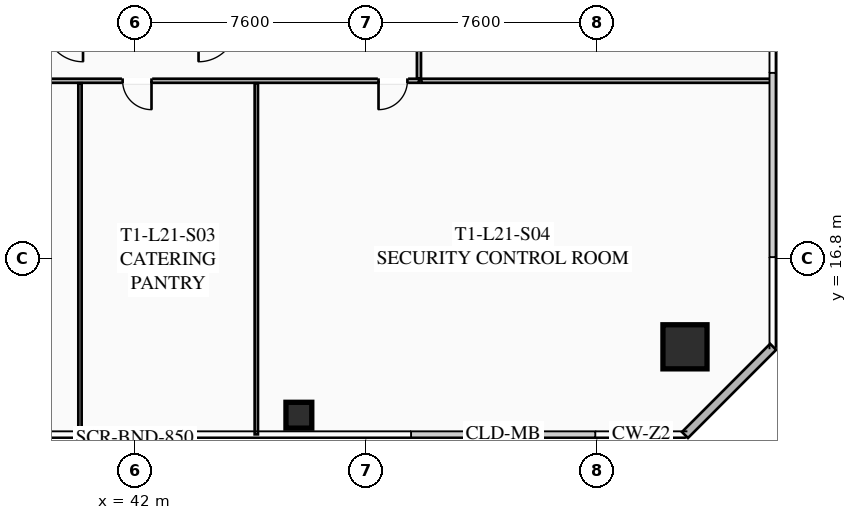
"""IFC4 building model, lengths in metres.
Left out: names, types, materials, properties, quantities, classifications, styles, units other than length and angle.
Written with IfcOpenShell. Run it as: python <this file> out.ifc"""

import sys

from ifc_helpers import new_model, si_unit, direction, frame, frame_2d, origin, origin_2d, place, context, subcontext, project, spatial, rectangle, hollow_rectangle, extrude, element, fill, save


model = new_model("IFC4")
c1 = context("Model", 3, precision=1e-05, world=origin(), true_north=direction((0.0, 1.0)))
c2 = subcontext(c1, "Body", "Model", "MODEL_VIEW")
j1 = project(units=[si_unit("LENGTHUNIT", "METRE"), si_unit("PLANEANGLEUNIT", "RADIAN")], contexts=[c1])
p1 = place(None, origin())
s1 = spatial("IfcSite", under=j1, at=p1, CompositionType="ELEMENT")
p2 = place(p1, origin())
s2 = spatial("IfcBuilding", under=s1, at=p2, CompositionType="ELEMENT")
p3 = place(p2, frame((0.0, 0.0, 81.4)))
s3 = spatial("IfcBuildingStorey", under=s2, at=p3, CompositionType="ELEMENT", Elevation=81.4)
p4 = place(p3, frame((60.1, 13.9, 0.0), z_axis=(0.0, 0.0, 1.0), x_axis=(1.0, 0.0, 0.0)))
e1 = element("IfcColumn", 1, at=p4, inside=s3, PredefinedType="COLUMN", context=c2, shape_type="SweptSolid", body=[
    extrude(hollow_rectangle(XDim=1.45, YDim=1.45, WallThickness=0.055, at=origin_2d()), origin(), (0.0, 0.0, 1.0), 3.35),
])
p5 = place(p3, frame((47.4, 11.65, 0.0), z_axis=(0.0, 0.0, 1.0), x_axis=(1.0, 0.0, 0.0)))
e2 = element("IfcColumn", 2, at=p5, inside=s3, PredefinedType="COLUMN", context=c2, shape_type="SweptSolid", body=[
    extrude(hollow_rectangle(XDim=0.85, YDim=0.85, WallThickness=0.035, at=origin_2d()), origin(), (0.0, 0.0, 1.0), 3.35),
])
p6 = place(p3, frame((63.0, 13.9, 0.0), z_axis=(0.0, 0.0, 1.0), x_axis=(-0.707106781187, -0.707106781187, 0.0)))
e3 = element("IfcWall", 3, at=p6, inside=s3, PredefinedType="SOLIDWALL", context=c2, shape_type="SweptSolid", body=[
    extrude(rectangle(XDim=4.101, YDim=0.28, at=frame_2d((2.051, 0.0))), origin(), (0.0, 0.0, 1.0), 3.35),
])
p7 = place(p3, frame((51.35, 22.65, 0.0), z_axis=(0.0, 0.0, 1.0), x_axis=(-1.0, 0.0, 0.0)))
e4 = element("IfcWall", 4, at=p7, inside=s3, PredefinedType="PARTITIONING", context=c2, shape_type="SweptSolid", body=[
    extrude(rectangle(XDim=27.3, YDim=0.135, at=frame_2d((13.65, 0.0))), origin(), (0.0, 0.0, 1.0), 2.703),
])
p8 = place(p7, frame((25.97, 0.0, 0.0)))
e5 = element("IfcOpeningElement", 5, at=p8, cuts=e4, PredefinedType="OPENING", context=c2, shape_type="SweptSolid", body=[
    extrude(rectangle(XDim=0.95, YDim=2.05, at=frame_2d((0.475, 1.025))), frame((0.0, 0.077, 0.0), z_axis=(0.0, -1.0, 0.0), x_axis=(1.0, 0.0, 0.0)), (0.0, 0.0, 1.0), 0.155),
])
p9 = place(p7, frame((12.79, 0.0, 0.0)))
e6 = element("IfcOpeningElement", 6, at=p9, cuts=e4, PredefinedType="OPENING", context=c2, shape_type="SweptSolid", body=[
    extrude(rectangle(XDim=0.95, YDim=2.05, at=frame_2d((0.475, 1.025))), frame((0.0, 0.077, 0.0), z_axis=(0.0, -1.0, 0.0), x_axis=(1.0, 0.0, 0.0)), (0.0, 0.0, 1.0), 0.155),
])
p10 = place(p7, frame((8.798, 0.0, 0.0)))
e7 = element("IfcOpeningElement", 7, at=p10, cuts=e4, PredefinedType="OPENING", context=c2, shape_type="SweptSolid", body=[
    extrude(rectangle(XDim=0.95, YDim=2.05, at=frame_2d((0.475, 1.025))), frame((0.0, 0.077, 0.0), z_axis=(0.0, -1.0, 0.0), x_axis=(1.0, 0.0, 0.0)), (0.0, 0.0, 1.0), 0.155),
])
p11 = place(p7, frame((0.38, 0.0, 0.0)))
e8 = element("IfcOpeningElement", 8, at=p11, cuts=e4, PredefinedType="OPENING", context=c2, shape_type="SweptSolid", body=[
    extrude(rectangle(XDim=0.95, YDim=2.05, at=frame_2d((0.475, 1.025))), frame((0.0, 0.077, 0.0), z_axis=(0.0, -1.0, 0.0), x_axis=(1.0, 0.0, 0.0)), (0.0, 0.0, 1.0), 0.155),
])
for number, where, z_axis, x_axis in (
    (9, (40.2, 11.02, 0.0), (0.0, 0.0, 1.0), (0.0, 1.0, 0.0)),
    (10, (46.0, 11.02, 0.0), (0.0, 0.0, 1.0), (0.0, 1.0, 0.0)),
):
    element("IfcWall", number, at=place(p3, frame(where, z_axis=z_axis, x_axis=x_axis)), inside=s3, PredefinedType="PARTITIONING", context=c2, shape_type="SweptSolid", body=[
        extrude(rectangle(XDim=11.55, YDim=0.11, at=frame_2d((5.775, 0.0))), origin(), (0.0, 0.0, 1.0), 2.703),
    ])
p12 = place(p3, frame((51.35, 43.44, 0.0), z_axis=(0.0, 0.0, 1.0), x_axis=(0.0, -1.0, 0.0)))
e11 = element("IfcWall", 11, at=p12, inside=s3, PredefinedType="PARTITIONING", context=c2, shape_type="SweptSolid", body=[
    extrude(rectangle(XDim=20.71, YDim=0.135, at=frame_2d((10.355, 0.0))), origin(), (0.0, 0.0, 1.0), 2.703),
])
p13 = place(p12, frame((0.3, 0.0, 0.0)))
e12 = element("IfcOpeningElement", 12, at=p13, cuts=e11, PredefinedType="OPENING", context=c2, shape_type="SweptSolid", body=[
    extrude(rectangle(XDim=0.95, YDim=2.05, at=frame_2d((0.475, 1.025))), frame((0.0, 0.077, 0.0), z_axis=(0.0, -1.0, 0.0), x_axis=(1.0, 0.0, 0.0)), (0.0, 0.0, 1.0), 0.155),
])
p14 = place(p3, frame((51.43, 22.65, 0.0), z_axis=(0.0, 0.0, 1.0), x_axis=(1.0, 0.0, 0.0)))
e13 = element("IfcWall", 13, at=p14, inside=s3, PredefinedType="PARTITIONING", context=c2, shape_type="SweptSolid", body=[
    extrude(rectangle(XDim=11.55, YDim=0.135, at=frame_2d((5.775, 0.0))), origin(), (0.0, 0.0, 1.0), 2.703),
])
p15 = place(p10, origin())
e14 = element("IfcDoor", 14, at=p15, inside=s3, OperationType="SINGLE_SWING_LEFT", PredefinedType="DOOR", context=c2, shape_type="SweptSolid", body=[
    extrude(rectangle(XDim=0.95, YDim=2.05, at=frame_2d((0.475, 1.025))), frame((0.0, 0.025, 0.0), z_axis=(0.0, -1.0, 0.0), x_axis=(1.0, 0.0, 0.0)), (0.0, 0.0, 1.0), 0.05),
])
fill(e7, e14)
p16 = place(p11, origin())
e15 = element("IfcDoor", 15, at=p16, inside=s3, OperationType="SINGLE_SWING_RIGHT", PredefinedType="DOOR", context=c2, shape_type="SweptSolid", body=[
    extrude(rectangle(XDim=0.95, YDim=2.05, at=frame_2d((0.475, 1.025))), frame((0.0, 0.025, 0.0), z_axis=(0.0, -1.0, 0.0), x_axis=(1.0, 0.0, 0.0)), (0.0, 0.0, 1.0), 0.05),
])
fill(e8, e15)
save(model, sys.argv[1])
